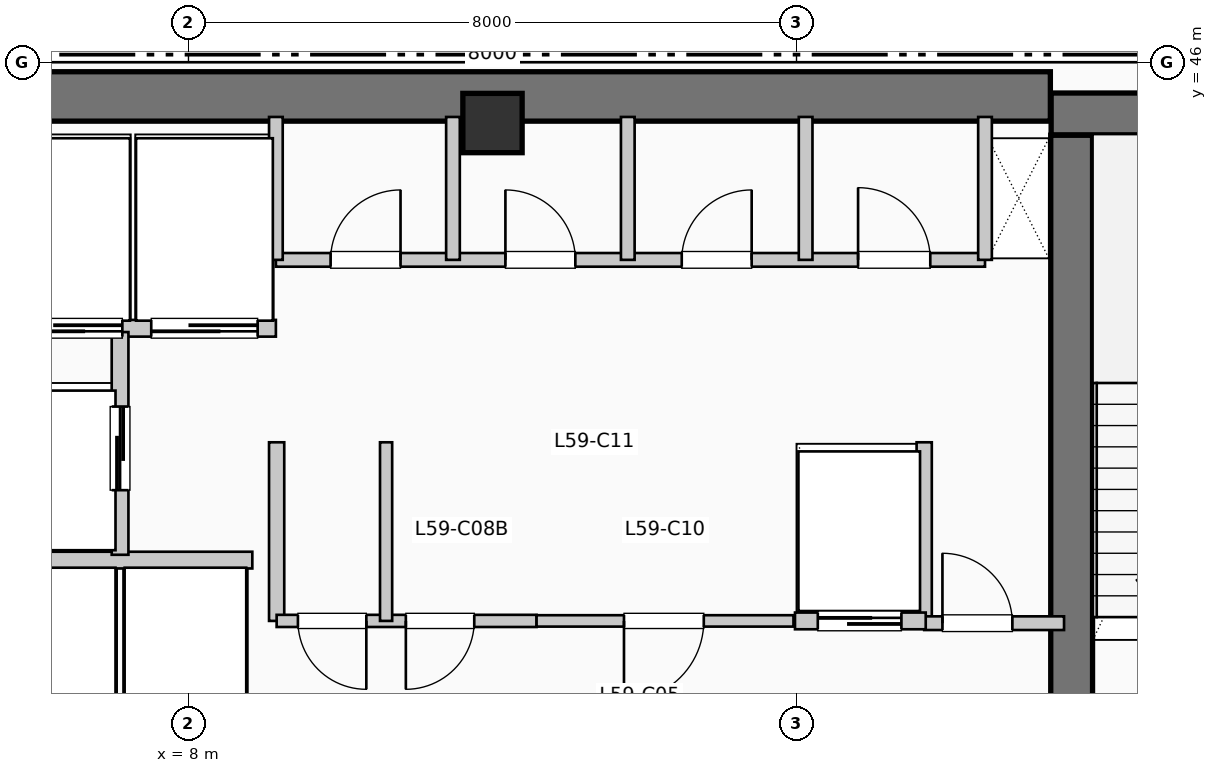
"""IFC4 building model, lengths in metres.
Left out: names, types, materials, properties, quantities, classifications, styles, units other than length and angle.
Written with IfcOpenShell. Run it as: python <this file> out.ifc"""

import sys

from ifc_helpers import new_model, si_unit, direction, frame, frame_2d, origin, origin_2d, place, context, subcontext, project, spatial, rectangle, extrude, element, fill, save


model = new_model("IFC4")
c1 = context("Model", 3, precision=1e-05, world=origin(), true_north=direction((0.0, 1.0)))
c2 = subcontext(c1, "Body", "Model", "MODEL_VIEW")
j1 = project(units=[si_unit("LENGTHUNIT", "METRE"), si_unit("PLANEANGLEUNIT", "RADIAN")], contexts=[c1])
p1 = place(None, origin())
s1 = spatial("IfcSite", under=j1, at=p1, CompositionType="ELEMENT")
p2 = place(p1, origin())
s2 = spatial("IfcBuilding", under=s1, at=p2, CompositionType="ELEMENT")
p3 = place(p2, frame((0.0, 0.0, 243.54)))
s3 = spatial("IfcBuildingStorey", under=s2, at=p3, CompositionType="ELEMENT", Elevation=243.54)
p4 = place(p3, frame((5.36, 45.55, 0.0), z_axis=(0.0, 0.0, 1.0), x_axis=(1.0, 0.0, 0.0)))
e1 = element("IfcWall", 1, at=p4, inside=s3, PredefinedType="SHEAR", context=c2, shape_type="SweptSolid", body=[
    extrude(rectangle(XDim=13.98, YDim=0.65, at=frame_2d((6.99, 0.0))), origin(), (0.0, 0.0, 1.0), 3.96),
])
p5 = place(p3, frame((19.62, 37.15, 0.0), z_axis=(0.0, 0.0, 1.0), x_axis=(0.0, 1.0, 0.0)))
e2 = element("IfcWall", 2, at=p5, inside=s3, PredefinedType="SHEAR", context=c2, shape_type="SweptSolid", body=[
    extrude(rectangle(XDim=7.89, YDim=0.55, at=frame_2d((3.945, 0.0))), origin(), (0.0, 0.0, 1.0), 3.96),
])
p6 = place(p3, frame((19.35, 45.32, 0.0), z_axis=(0.0, 0.0, 1.0), x_axis=(1.0, 0.0, 0.0)))
e3 = element("IfcWall", 3, at=p6, inside=s3, PredefinedType="SHEAR", context=c2, shape_type="SweptSolid", body=[
    extrude(rectangle(XDim=3.69, YDim=0.55, at=frame_2d((1.845, 0.0))), origin(), (0.0, 0.0, 1.0), 3.96),
])
p7 = place(p6, frame((1.15, 0.0, 1.05)))
e4 = element("IfcOpeningElement", 4, at=p7, cuts=e3, PredefinedType="OPENING", context=c2, shape_type="SweptSolid", body=[
    extrude(rectangle(XDim=1.4, YDim=1.8, at=frame_2d((0.7, 0.9))), frame((0.0, 0.285, 0.0), z_axis=(0.0, -1.0, 0.0), x_axis=(1.0, 0.0, 0.0)), (0.0, 0.0, 1.0), 0.57),
])
p8 = place(p3, frame((12.0, 45.2, 0.0), z_axis=(0.0, 0.0, 1.0), x_axis=(1.0, 0.0, 0.0)))
e5 = element("IfcColumn", 5, at=p8, inside=s3, PredefinedType="COLUMN", context=c2, shape_type="SweptSolid", body=[
    extrude(rectangle(XDim=0.78, YDim=0.78, at=origin_2d()), origin(), (0.0, 0.0, 1.0), 3.96),
])
p9 = place(p3, frame((5.38, 39.45, 0.0), z_axis=(0.0, 0.0, 1.0), x_axis=(1.0, 0.0, 0.0)))
e6 = element("IfcWall", 6, at=p9, inside=s3, PredefinedType="PARTITIONING", context=c2, shape_type="SweptSolid", body=[
    extrude(rectangle(XDim=3.46, YDim=0.22, at=frame_2d((1.73, 0.0))), origin(), (0.0, 0.0, 1.0), 3.71),
])
p10 = place(p3, frame((5.38, 42.5, 0.0), z_axis=(0.0, 0.0, 1.0), x_axis=(1.0, 0.0, 0.0)))
e7 = element("IfcWall", 7, at=p10, inside=s3, PredefinedType="PARTITIONING", context=c2, shape_type="SweptSolid", body=[
    extrude(rectangle(XDim=3.77, YDim=0.22, at=frame_2d((1.885, 0.0))), origin(), (0.0, 0.0, 1.0), 3.71),
])
p11 = place(p10, frame((1.75, 0.0, 0.0), z_axis=(0.0, 0.0, 1.0), x_axis=(-1.0, 0.0, 0.0)))
e8 = element("IfcOpeningElement", 8, at=p11, cuts=e7, PredefinedType="OPENING", context=c2, shape_type="SweptSolid", body=[
    extrude(rectangle(XDim=1.4, YDim=2.2, at=frame_2d((0.7, 1.1))), frame((0.0, 0.12, 0.0), z_axis=(0.0, -1.0, 0.0), x_axis=(1.0, 0.0, 0.0)), (0.0, 0.0, 1.0), 0.24),
])
p12 = place(p10, frame((3.53, 0.0, 0.0), z_axis=(0.0, 0.0, 1.0), x_axis=(-1.0, 0.0, 0.0)))
e9 = element("IfcOpeningElement", 9, at=p12, cuts=e7, PredefinedType="OPENING", context=c2, shape_type="SweptSolid", body=[
    extrude(rectangle(XDim=1.4, YDim=2.2, at=frame_2d((0.7, 1.1))), frame((0.0, 0.12, 0.0), z_axis=(0.0, -1.0, 0.0), x_axis=(1.0, 0.0, 0.0)), (0.0, 0.0, 1.0), 0.24),
])
p13 = place(p3, frame((7.1, 39.52, 0.0), z_axis=(0.0, 0.0, 1.0), x_axis=(0.0, 1.0, 0.0)))
e10 = element("IfcWall", 10, at=p13, inside=s3, PredefinedType="PARTITIONING", context=c2, shape_type="SweptSolid", body=[
    extrude(rectangle(XDim=2.93, YDim=0.22, at=frame_2d((1.465, 0.0))), origin(), (0.0, 0.0, 1.0), 3.71),
])
p14 = place(p13, frame((0.85, 0.0, 0.0)))
e11 = element("IfcOpeningElement", 11, at=p14, cuts=e10, PredefinedType="OPENING", context=c2, shape_type="SweptSolid", body=[
    extrude(rectangle(XDim=1.1, YDim=2.2, at=frame_2d((0.55, 1.1))), frame((0.0, 0.12, 0.0), z_axis=(0.0, -1.0, 0.0), x_axis=(1.0, 0.0, 0.0)), (0.0, 0.0, 1.0), 0.24),
])
for number, where, z_axis, x_axis in (
    (12, (9.16, 38.65, 0.0), (0.0, 0.0, 1.0), (0.0, 1.0, 0.0)),
    (13, (17.68, 38.65, 0.0), (0.0, 0.0, 1.0), (0.0, 1.0, 0.0)),
):
    element("IfcWall", number, at=place(p3, frame(where, z_axis=z_axis, x_axis=x_axis)), inside=s3, PredefinedType="PARTITIONING", context=c2, shape_type="SweptSolid", body=[
        extrude(rectangle(XDim=2.35, YDim=0.2, at=frame_2d((1.175, 0.0))), origin(), (0.0, 0.0, 1.0), 3.71),
    ])
p15 = place(p3, frame((17.68, 38.62, 0.0), z_axis=(0.0, 0.0, 1.0), x_axis=(1.0, 0.0, 0.0)))
e14 = element("IfcWall", 14, at=p15, inside=s3, PredefinedType="PARTITIONING", context=c2, shape_type="SweptSolid", body=[
    extrude(rectangle(XDim=1.84, YDim=0.18, at=frame_2d((0.92, 0.0))), origin(), (0.0, 0.0, 1.0), 3.71),
])
p16 = place(p15, frame((0.24, 0.0, 0.0)))
e15 = element("IfcOpeningElement", 15, at=p16, cuts=e14, PredefinedType="OPENING", context=c2, shape_type="SweptSolid", body=[
    extrude(rectangle(XDim=0.92, YDim=2.1, at=frame_2d((0.46, 1.05))), frame((0.0, 0.1, 0.0), z_axis=(0.0, -1.0, 0.0), x_axis=(1.0, 0.0, 0.0)), (0.0, 0.0, 1.0), 0.2),
])
p17 = place(p3, frame((9.16, 38.65, 0.0), z_axis=(0.0, 0.0, 1.0), x_axis=(1.0, 0.0, 0.0)))
e16 = element("IfcWall", 16, at=p17, inside=s3, PredefinedType="PARTITIONING", context=c2, shape_type="SweptSolid", body=[
    extrude(rectangle(XDim=3.42, YDim=0.16, at=frame_2d((1.71, 0.0))), origin(), (0.0, 0.0, 1.0), 3.71),
])
p18 = place(p17, frame((1.18, 0.0, 0.0), z_axis=(0.0, 0.0, 1.0), x_axis=(-1.0, 0.0, 0.0)))
e17 = element("IfcOpeningElement", 17, at=p18, cuts=e16, PredefinedType="OPENING", context=c2, shape_type="SweptSolid", body=[
    extrude(rectangle(XDim=0.9, YDim=2.15, at=frame_2d((0.45, 1.075))), frame((0.0, 0.09, 0.0), z_axis=(0.0, -1.0, 0.0), x_axis=(1.0, 0.0, 0.0)), (0.0, 0.0, 1.0), 0.18),
])
p19 = place(p17, frame((2.6, 0.0, 0.0), z_axis=(0.0, 0.0, 1.0), x_axis=(-1.0, 0.0, 0.0)))
e18 = element("IfcOpeningElement", 18, at=p19, cuts=e16, PredefinedType="OPENING", context=c2, shape_type="SweptSolid", body=[
    extrude(rectangle(XDim=0.9, YDim=2.15, at=frame_2d((0.45, 1.075))), frame((0.0, 0.09, 0.0), z_axis=(0.0, -1.0, 0.0), x_axis=(1.0, 0.0, 0.0)), (0.0, 0.0, 1.0), 0.18),
])
p20 = place(p3, frame((10.6, 38.65, 0.0), z_axis=(0.0, 0.0, 1.0), x_axis=(0.0, 1.0, 0.0)))
e19 = element("IfcWall", 19, at=p20, inside=s3, PredefinedType="PARTITIONING", context=c2, shape_type="SweptSolid", body=[
    extrude(rectangle(XDim=2.35, YDim=0.16, at=frame_2d((1.175, 0.0))), origin(), (0.0, 0.0, 1.0), 3.71),
])
p21 = place(p3, frame((12.58, 38.65, 0.0), z_axis=(0.0, 0.0, 1.0), x_axis=(1.0, 0.0, 0.0)))
e20 = element("IfcWall", 20, at=p21, inside=s3, PredefinedType="PARTITIONING", context=c2, shape_type="SweptSolid", body=[
    extrude(rectangle(XDim=3.38, YDim=0.15, at=frame_2d((1.69, 0.0))), origin(), (0.0, 0.0, 1.0), 3.71),
])
p22 = place(p21, frame((2.2, 0.0, 0.0), z_axis=(0.0, 0.0, 1.0), x_axis=(-1.0, 0.0, 0.0)))
e21 = element("IfcOpeningElement", 21, at=p22, cuts=e20, PredefinedType="OPENING", context=c2, shape_type="SweptSolid", body=[
    extrude(rectangle(XDim=1.05, YDim=2.15, at=frame_2d((0.525, 1.075))), frame((0.0, 0.085, 0.0), z_axis=(0.0, -1.0, 0.0), x_axis=(1.0, 0.0, 0.0)), (0.0, 0.0, 1.0), 0.17),
])
p23 = place(p3, frame((15.98, 38.65, 0.0), z_axis=(0.0, 0.0, 1.0), x_axis=(1.0, 0.0, 0.0)))
e22 = element("IfcWall", 22, at=p23, inside=s3, PredefinedType="PARTITIONING", context=c2, shape_type="SweptSolid", body=[
    extrude(rectangle(XDim=1.72, YDim=0.22, at=frame_2d((0.86, 0.0))), origin(), (0.0, 0.0, 1.0), 3.71),
])
p24 = place(p23, frame((0.3, 0.0, 0.0)))
e23 = element("IfcOpeningElement", 23, at=p24, cuts=e22, PredefinedType="OPENING", context=c2, shape_type="SweptSolid", body=[
    extrude(rectangle(XDim=1.1, YDim=2.2, at=frame_2d((0.55, 1.1))), frame((0.0, 0.12, 0.0), z_axis=(0.0, -1.0, 0.0), x_axis=(1.0, 0.0, 0.0)), (0.0, 0.0, 1.0), 0.24),
])
p25 = place(p3, frame((9.15, 43.4, 0.0), z_axis=(0.0, 0.0, 1.0), x_axis=(1.0, 0.0, 0.0)))
e24 = element("IfcWall", 24, at=p25, inside=s3, PredefinedType="PLUMBINGWALL", context=c2, shape_type="SweptSolid", body=[
    extrude(rectangle(XDim=9.33, YDim=0.18, at=frame_2d((4.665, 0.0))), origin(), (0.0, 0.0, 1.0), 3.71),
])
p26 = place(p25, frame((0.72, 0.0, 0.0)))
e25 = element("IfcOpeningElement", 25, at=p26, cuts=e24, PredefinedType="OPENING", context=c2, shape_type="SweptSolid", body=[
    extrude(rectangle(XDim=0.92, YDim=2.1, at=frame_2d((0.46, 1.05))), frame((0.0, 0.1, 0.0), z_axis=(0.0, -1.0, 0.0), x_axis=(1.0, 0.0, 0.0)), (0.0, 0.0, 1.0), 0.2),
])
p27 = place(p25, frame((3.02, 0.0, 0.0)))
e26 = element("IfcOpeningElement", 26, at=p27, cuts=e24, PredefinedType="OPENING", context=c2, shape_type="SweptSolid", body=[
    extrude(rectangle(XDim=0.92, YDim=2.1, at=frame_2d((0.46, 1.05))), frame((0.0, 0.1, 0.0), z_axis=(0.0, -1.0, 0.0), x_axis=(1.0, 0.0, 0.0)), (0.0, 0.0, 1.0), 0.2),
])
p28 = place(p25, frame((5.34, 0.0, 0.0)))
e27 = element("IfcOpeningElement", 27, at=p28, cuts=e24, PredefinedType="OPENING", context=c2, shape_type="SweptSolid", body=[
    extrude(rectangle(XDim=0.92, YDim=2.1, at=frame_2d((0.46, 1.05))), frame((0.0, 0.1, 0.0), z_axis=(0.0, -1.0, 0.0), x_axis=(1.0, 0.0, 0.0)), (0.0, 0.0, 1.0), 0.2),
])
p29 = place(p25, frame((7.66, 0.0, 0.0)))
e28 = element("IfcOpeningElement", 28, at=p29, cuts=e24, PredefinedType="OPENING", context=c2, shape_type="SweptSolid", body=[
    extrude(rectangle(XDim=0.95, YDim=2.1, at=frame_2d((0.475, 1.05))), frame((0.0, 0.1, 0.0), z_axis=(0.0, -1.0, 0.0), x_axis=(1.0, 0.0, 0.0)), (0.0, 0.0, 1.0), 0.2),
])
for number, where, z_axis, x_axis in (
    (29, (9.15, 43.4, 0.0), (0.0, 0.0, 1.0), (0.0, 1.0, 0.0)),
    (30, (18.48, 43.4, 0.0), (0.0, 0.0, 1.0), (0.0, 1.0, 0.0)),
    (31, (11.48, 43.4, 0.0), (0.0, 0.0, 1.0), (0.0, 1.0, 0.0)),
    (32, (13.78, 43.4, 0.0), (0.0, 0.0, 1.0), (0.0, 1.0, 0.0)),
    (33, (16.12, 43.4, 0.0), (0.0, 0.0, 1.0), (0.0, 1.0, 0.0)),
):
    element("IfcWall", number, at=place(p3, frame(where, z_axis=z_axis, x_axis=x_axis)), inside=s3, PredefinedType="PLUMBINGWALL", context=c2, shape_type="SweptSolid", body=[
        extrude(rectangle(XDim=1.88, YDim=0.18, at=frame_2d((0.94, 0.0))), origin(), (0.0, 0.0, 1.0), 3.71),
    ])
p30 = place(p11, origin())
e34 = element("IfcDoor", 34, at=p30, inside=s3, OperationType="SLIDING_TO_LEFT", PredefinedType="DOOR", context=c2, shape_type="SweptSolid", body=[
    extrude(rectangle(XDim=1.4, YDim=2.2, at=frame_2d((0.7, 1.1))), frame((0.0, 0.025, 0.0), z_axis=(0.0, -1.0, 0.0), x_axis=(1.0, 0.0, 0.0)), (0.0, 0.0, 1.0), 0.05),
])
fill(e8, e34)
p31 = place(p12, origin())
e35 = element("IfcDoor", 35, at=p31, inside=s3, OperationType="SLIDING_TO_LEFT", PredefinedType="DOOR", context=c2, shape_type="SweptSolid", body=[
    extrude(rectangle(XDim=1.4, YDim=2.2, at=frame_2d((0.7, 1.1))), frame((0.0, 0.025, 0.0), z_axis=(0.0, -1.0, 0.0), x_axis=(1.0, 0.0, 0.0)), (0.0, 0.0, 1.0), 0.05),
])
fill(e9, e35)
p32 = place(p14, origin())
e36 = element("IfcDoor", 36, at=p32, inside=s3, OperationType="SLIDING_TO_LEFT", PredefinedType="DOOR", context=c2, shape_type="SweptSolid", body=[
    extrude(rectangle(XDim=1.1, YDim=2.2, at=frame_2d((0.55, 1.1))), frame((0.0, 0.025, 0.0), z_axis=(0.0, -1.0, 0.0), x_axis=(1.0, 0.0, 0.0)), (0.0, 0.0, 1.0), 0.05),
])
fill(e11, e36)
p33 = place(p16, origin())
e37 = element("IfcDoor", 37, at=p33, inside=s3, OperationType="SINGLE_SWING_LEFT", PredefinedType="DOOR", context=c2, shape_type="SweptSolid", body=[
    extrude(rectangle(XDim=0.92, YDim=2.1, at=frame_2d((0.46, 1.05))), frame((0.0, 0.025, 0.0), z_axis=(0.0, -1.0, 0.0), x_axis=(1.0, 0.0, 0.0)), (0.0, 0.0, 1.0), 0.05),
])
fill(e15, e37)
p34 = place(p18, origin())
e38 = element("IfcDoor", 38, at=p34, inside=s3, OperationType="SINGLE_SWING_RIGHT", PredefinedType="DOOR", context=c2, shape_type="SweptSolid", body=[
    extrude(rectangle(XDim=0.9, YDim=2.15, at=frame_2d((0.45, 1.075))), frame((0.0, 0.025, 0.0), z_axis=(0.0, -1.0, 0.0), x_axis=(1.0, 0.0, 0.0)), (0.0, 0.0, 1.0), 0.05),
])
fill(e17, e38)
p35 = place(p19, origin())
e39 = element("IfcDoor", 39, at=p35, inside=s3, OperationType="SINGLE_SWING_LEFT", PredefinedType="DOOR", context=c2, shape_type="SweptSolid", body=[
    extrude(rectangle(XDim=0.9, YDim=2.15, at=frame_2d((0.45, 1.075))), frame((0.0, 0.025, 0.0), z_axis=(0.0, -1.0, 0.0), x_axis=(1.0, 0.0, 0.0)), (0.0, 0.0, 1.0), 0.05),
])
fill(e18, e39)
p36 = place(p22, origin())
e40 = element("IfcDoor", 40, at=p36, inside=s3, OperationType="SINGLE_SWING_LEFT", PredefinedType="DOOR", context=c2, shape_type="SweptSolid", body=[
    extrude(rectangle(XDim=1.05, YDim=2.15, at=frame_2d((0.525, 1.075))), frame((0.0, 0.025, 0.0), z_axis=(0.0, -1.0, 0.0), x_axis=(1.0, 0.0, 0.0)), (0.0, 0.0, 1.0), 0.05),
])
fill(e21, e40)
p37 = place(p24, origin())
e41 = element("IfcDoor", 41, at=p37, inside=s3, OperationType="SLIDING_TO_LEFT", PredefinedType="DOOR", context=c2, shape_type="SweptSolid", body=[
    extrude(rectangle(XDim=1.1, YDim=2.2, at=frame_2d((0.55, 1.1))), frame((0.0, 0.025, 0.0), z_axis=(0.0, -1.0, 0.0), x_axis=(1.0, 0.0, 0.0)), (0.0, 0.0, 1.0), 0.05),
])
fill(e23, e41)
p38 = place(p26, origin())
e42 = element("IfcDoor", 42, at=p38, inside=s3, OperationType="SINGLE_SWING_RIGHT", PredefinedType="DOOR", context=c2, shape_type="SweptSolid", body=[
    extrude(rectangle(XDim=0.92, YDim=2.1, at=frame_2d((0.46, 1.05))), frame((0.0, 0.025, 0.0), z_axis=(0.0, -1.0, 0.0), x_axis=(1.0, 0.0, 0.0)), (0.0, 0.0, 1.0), 0.05),
])
fill(e25, e42)
p39 = place(p27, origin())
e43 = element("IfcDoor", 43, at=p39, inside=s3, OperationType="SINGLE_SWING_LEFT", PredefinedType="DOOR", context=c2, shape_type="SweptSolid", body=[
    extrude(rectangle(XDim=0.92, YDim=2.1, at=frame_2d((0.46, 1.05))), frame((0.0, 0.025, 0.0), z_axis=(0.0, -1.0, 0.0), x_axis=(1.0, 0.0, 0.0)), (0.0, 0.0, 1.0), 0.05),
])
fill(e26, e43)
p40 = place(p28, origin())
e44 = element("IfcDoor", 44, at=p40, inside=s3, OperationType="SINGLE_SWING_RIGHT", PredefinedType="DOOR", context=c2, shape_type="SweptSolid", body=[
    extrude(rectangle(XDim=0.92, YDim=2.1, at=frame_2d((0.46, 1.05))), frame((0.0, 0.025, 0.0), z_axis=(0.0, -1.0, 0.0), x_axis=(1.0, 0.0, 0.0)), (0.0, 0.0, 1.0), 0.05),
])
fill(e27, e44)
p41 = place(p29, origin())
e45 = element("IfcDoor", 45, at=p41, inside=s3, OperationType="SINGLE_SWING_LEFT", PredefinedType="DOOR", context=c2, shape_type="SweptSolid", body=[
    extrude(rectangle(XDim=0.95, YDim=2.1, at=frame_2d((0.475, 1.05))), frame((0.0, 0.025, 0.0), z_axis=(0.0, -1.0, 0.0), x_axis=(1.0, 0.0, 0.0)), (0.0, 0.0, 1.0), 0.05),
])
fill(e28, e45)
save(model, sys.argv[1])
